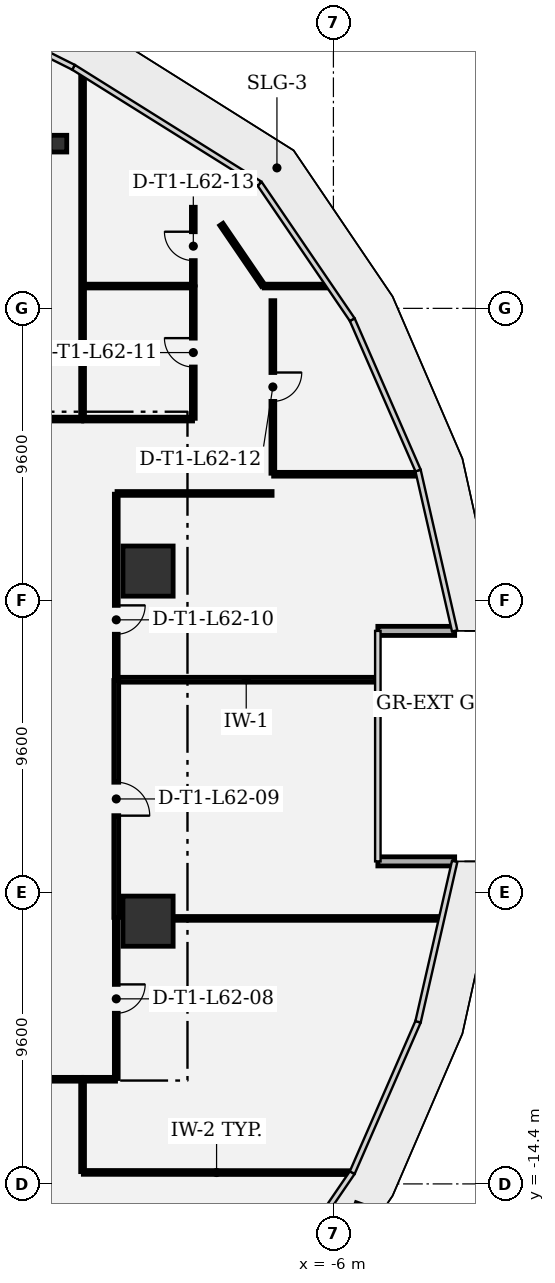
"""IFC4 building model, lengths in metres.
Left out: names, types, materials, properties, quantities, classifications, styles, units other than length and angle.
Written with IfcOpenShell. Run it as: python <this file> out.ifc"""

import sys

from ifc_helpers import new_model, si_unit, direction, frame, frame_2d, origin, origin_2d, place, context, subcontext, project, spatial, rectangle, extrude, element, fill, save


model = new_model("IFC4")
c1 = context("Model", 3, precision=1e-05, world=origin(), true_north=direction((0.0, 1.0)))
c2 = subcontext(c1, "Body", "Model", "MODEL_VIEW")
j1 = project(units=[si_unit("LENGTHUNIT", "METRE"), si_unit("PLANEANGLEUNIT", "RADIAN")], contexts=[c1])
p1 = place(None, origin())
s1 = spatial("IfcSite", under=j1, at=p1, CompositionType="ELEMENT")
p2 = place(p1, origin())
s2 = spatial("IfcBuilding", under=s1, at=p2, CompositionType="ELEMENT")
p3 = place(p2, frame((0.0, 0.0, 268.2)))
s3 = spatial("IfcBuildingStorey", under=s2, at=p3, CompositionType="ELEMENT", Elevation=268.2)
for number, where, z_axis, x_axis in (
    (1, (-12.097, -5.758, 0.0), (0.0, 0.0, 1.0), (1.0, 0.0, 0.0)),
    (2, (-12.097, 5.758, 0.0), (0.0, 0.0, 1.0), (1.0, 0.0, 0.0)),
):
    element("IfcColumn", number, at=place(p3, frame(where, z_axis=z_axis, x_axis=x_axis)), inside=s3, PredefinedType="COLUMN", context=c2, shape_type="SweptSolid", body=[
        extrude(rectangle(XDim=1.65, YDim=1.65, at=origin_2d()), origin(), (0.0, 0.0, 1.0), 4.2),
    ])
p4 = place(p3, frame((-15.046, 19.818, 0.0), z_axis=(0.0, 0.0, 1.0), x_axis=(1.0, 0.0, 0.0)))
e3 = element("IfcColumn", 3, at=p4, inside=s3, PredefinedType="COLUMN", context=c2, shape_type="SweptSolid", body=[
    extrude(rectangle(XDim=0.55, YDim=0.55, at=origin_2d()), origin(), (0.0, 0.0, 1.0), 4.2),
])
for number, where, z_axis, x_axis in (
    (4, (-2.011, -3.791, 0.0), (0.0, 0.0, 1.0), (-1.0, 0.0, 0.0)),
    (5, (-4.539, 3.791, 0.0), (0.0, 0.0, 1.0), (1.0, 0.0, 0.0)),
):
    element("IfcWall", number, at=place(p3, frame(where, z_axis=z_axis, x_axis=x_axis)), inside=s3, PredefinedType="SOLIDWALL", context=c2, shape_type="SweptSolid", body=[
        extrude(rectangle(XDim=2.527, YDim=0.3, at=frame_2d((1.264, 0.0))), origin(), (0.0, 0.0, 1.0), 3.91),
    ])
p5 = place(p3, frame((-14.225, -14.021, 0.0), z_axis=(0.0, 0.0, 1.0), x_axis=(0.999999627134, -0.000863557536, 0.0)))
e6 = element("IfcWall", 6, at=p5, inside=s3, PredefinedType="PARTITIONING", context=c2, shape_type="SweptSolid", body=[
    extrude(rectangle(XDim=8.764, YDim=0.125, at=frame_2d((4.382, 0.0))), origin(), (0.0, 0.0, 1.0), 3.91),
])
p6 = place(p3, frame((-14.25, -13.997, 0.0), z_axis=(0.0, 0.0, 1.0), x_axis=(0.0, 1.0, 0.0)))
e7 = element("IfcWall", 7, at=p6, inside=s3, PredefinedType="PARTITIONING", context=c2, shape_type="SweptSolid", body=[
    extrude(rectangle(XDim=3.014, YDim=0.125, at=frame_2d((1.507, 0.0))), origin(), (0.0, 0.0, 1.0), 3.13),
])
p7 = place(p3, frame((-38.384, -10.958, 0.0), z_axis=(0.0, 0.0, 1.0), x_axis=(1.0, 0.0, 0.0)))
e8 = element("IfcWall", 8, at=p7, inside=s3, PredefinedType="PARTITIONING", context=c2, shape_type="SweptSolid", body=[
    extrude(rectangle(XDim=24.109, YDim=0.125, at=frame_2d((12.055, 0.0))), origin(), (0.0, 0.0, 1.0), 3.13),
])
p8 = place(p7, frame((11.58, 0.0, 0.0)))
e9 = element("IfcOpeningElement", 9, at=p8, cuts=e8, PredefinedType="OPENING", context=c2, shape_type="SweptSolid", body=[
    extrude(rectangle(XDim=0.95, YDim=2.15, at=frame_2d((0.475, 1.075))), frame((0.0, 0.073, 0.0), z_axis=(0.0, -1.0, 0.0), x_axis=(1.0, 0.0, 0.0)), (0.0, 0.0, 1.0), 0.145),
])
p9 = place(p3, frame((-14.275, 10.758, 0.0), z_axis=(0.0, 0.0, 1.0), x_axis=(-1.0, 0.0, 0.0)))
e10 = element("IfcWall", 10, at=p9, inside=s3, PredefinedType="PARTITIONING", context=c2, shape_type="SweptSolid", body=[
    extrude(rectangle(XDim=23.473, YDim=0.125, at=frame_2d((11.736, 0.0))), origin(), (0.0, 0.0, 1.0), 3.13),
])
p10 = place(p3, frame((-14.25, 10.783, 0.0), z_axis=(0.0, 0.0, 1.0), x_axis=(0.0, 1.0, 0.0)))
e11 = element("IfcWall", 11, at=p10, inside=s3, PredefinedType="PARTITIONING", context=c2, shape_type="SweptSolid", body=[
    extrude(rectangle(XDim=11.28, YDim=0.125, at=frame_2d((5.64, 0.0))), origin(), (0.0, 0.0, 1.0), 3.13),
])
p11 = place(p3, frame((-2.52, -5.667, 0.0), z_axis=(0.0, 0.0, 1.0), x_axis=(-1.0, 0.0, 0.0)))
e12 = element("IfcWall", 12, at=p11, inside=s3, PredefinedType="PARTITIONING", context=c2, shape_type="SweptSolid", body=[
    extrude(rectangle(XDim=8.687, YDim=0.125, at=frame_2d((4.344, 0.0))), origin(), (0.0, 0.0, 1.0), 3.91),
])
p12 = place(p3, frame((-13.142, -5.692, 0.0), z_axis=(0.0, 0.0, 1.0), x_axis=(0.0, -1.0, 0.0)))
e13 = element("IfcWall", 13, at=p12, inside=s3, PredefinedType="PARTITIONING", context=c2, shape_type="SweptSolid", body=[
    extrude(rectangle(XDim=5.241, YDim=0.125, at=frame_2d((2.621, 0.0))), origin(), (0.0, 0.0, 1.0), 3.13),
])
p13 = place(p12, frame((2.146, 0.0, 0.0)))
e14 = element("IfcOpeningElement", 14, at=p13, cuts=e13, PredefinedType="OPENING", context=c2, shape_type="SweptSolid", body=[
    extrude(rectangle(XDim=0.95, YDim=2.15, at=frame_2d((0.475, 1.075))), frame((0.0, 0.073, 0.0), z_axis=(0.0, -1.0, 0.0), x_axis=(1.0, 0.0, 0.0)), (0.0, 0.0, 1.0), 0.145),
])
p14 = place(p3, frame((-14.217, -10.958, 0.0), z_axis=(0.0, 0.0, 1.0), x_axis=(1.0, 0.0, 0.0)))
e15 = element("IfcWall", 15, at=p14, inside=s3, PredefinedType="PARTITIONING", context=c2, shape_type="SweptSolid", body=[
    extrude(rectangle(XDim=1.05, YDim=0.125, at=frame_2d((0.525, 0.0))), origin(), (0.0, 0.0, 1.0), 3.91),
])
p15 = place(p3, frame((-4.619, 2.184, 0.0), z_axis=(0.0, 0.0, 1.0), x_axis=(-1.0, 0.0, 0.0)))
e16 = element("IfcWall", 16, at=p15, inside=s3, PredefinedType="PARTITIONING", context=c2, shape_type="SweptSolid", body=[
    extrude(rectangle(XDim=8.499, YDim=0.16, at=frame_2d((4.249, 0.0))), origin(), (0.0, 0.0, 1.0), 3.91),
])
p16 = place(p3, frame((-13.142, 2.159, 0.0), z_axis=(0.0, 0.0, 1.0), x_axis=(0.0, -1.0, 0.0)))
e17 = element("IfcWall", 17, at=p16, inside=s3, PredefinedType="PARTITIONING", context=c2, shape_type="SweptSolid", body=[
    extrude(rectangle(XDim=7.793, YDim=0.16, at=frame_2d((3.896, 0.0))), origin(), (0.0, 0.0, 1.0), 3.91),
])
p17 = place(p16, frame((3.346, 0.0, 0.0)))
e18 = element("IfcOpeningElement", 18, at=p17, cuts=e17, PredefinedType="OPENING", context=c2, shape_type="SweptSolid", body=[
    extrude(rectangle(XDim=1.1, YDim=2.15, at=frame_2d((0.55, 1.075))), frame((0.0, 0.09, 0.0), z_axis=(0.0, -1.0, 0.0), x_axis=(1.0, 0.0, 0.0)), (0.0, 0.0, 1.0), 0.18),
])
p18 = place(p3, frame((-3.268, 8.943, 0.0), z_axis=(0.0, 0.0, 1.0), x_axis=(-1.0, 0.0, 0.0)))
e19 = element("IfcWall", 19, at=p18, inside=s3, PredefinedType="PARTITIONING", context=c2, shape_type="SweptSolid", body=[
    extrude(rectangle(XDim=4.699, YDim=0.125, at=frame_2d((2.349, 0.0))), origin(), (0.0, 0.0, 1.0), 3.91),
])
p19 = place(p3, frame((-8.017, 8.312, 0.0), z_axis=(0.0, 0.0, 1.0), x_axis=(-1.0, 0.0, 0.0)))
e20 = element("IfcWall", 20, at=p19, inside=s3, PredefinedType="PARTITIONING", context=c2, shape_type="SweptSolid", body=[
    extrude(rectangle(XDim=5.1, YDim=0.125, at=frame_2d((2.55, 0.0))), origin(), (0.0, 0.0, 1.0), 3.91),
])
p20 = place(p3, frame((-13.142, 8.287, 0.0), z_axis=(0.0, 0.0, 1.0), x_axis=(0.0, -1.0, 0.0)))
e21 = element("IfcWall", 21, at=p20, inside=s3, PredefinedType="PARTITIONING", context=c2, shape_type="SweptSolid", body=[
    extrude(rectangle(XDim=6.07, YDim=0.125, at=frame_2d((3.035, 0.0))), origin(), (0.0, 0.0, 1.0), 3.13),
])
p21 = place(p20, frame((3.657, 0.0, 0.0)))
e22 = element("IfcOpeningElement", 22, at=p21, cuts=e21, PredefinedType="OPENING", context=c2, shape_type="SweptSolid", body=[
    extrude(rectangle(XDim=0.95, YDim=2.15, at=frame_2d((0.475, 1.075))), frame((0.0, 0.073, 0.0), z_axis=(0.0, -1.0, 0.0), x_axis=(1.0, 0.0, 0.0)), (0.0, 0.0, 1.0), 0.145),
])
p22 = place(p3, frame((-6.214, 15.134, 0.0), z_axis=(0.0, 0.0, 1.0), x_axis=(-1.0, 0.0, 0.0)))
e23 = element("IfcWall", 23, at=p22, inside=s3, PredefinedType="PARTITIONING", context=c2, shape_type="SweptSolid", body=[
    extrude(rectangle(XDim=2.064, YDim=0.125, at=frame_2d((1.032, 0.0))), origin(), (0.0, 0.0, 1.0), 3.91),
])
p23 = place(p3, frame((-7.992, 14.653, 0.0), z_axis=(0.0, 0.0, 1.0), x_axis=(0.0, -1.0, 0.0)))
e24 = element("IfcWall", 24, at=p23, inside=s3, PredefinedType="PARTITIONING", context=c2, shape_type="SweptSolid", body=[
    extrude(rectangle(XDim=5.677, YDim=0.125, at=frame_2d((2.838, 0.0))), origin(), (0.0, 0.0, 1.0), 3.91),
])
p24 = place(p23, frame((2.363, 0.0, 0.0)))
e25 = element("IfcOpeningElement", 25, at=p24, cuts=e24, PredefinedType="OPENING", context=c2, shape_type="SweptSolid", body=[
    extrude(rectangle(XDim=0.95, YDim=2.15, at=frame_2d((0.475, 1.075))), frame((0.0, 0.073, 0.0), z_axis=(0.0, -1.0, 0.0), x_axis=(1.0, 0.0, 0.0)), (0.0, 0.0, 1.0), 0.145),
])
p25 = place(p3, frame((-14.217, 10.758, 0.0), z_axis=(0.0, 0.0, 1.0), x_axis=(1.0, 0.0, 0.0)))
e26 = element("IfcWall", 26, at=p25, inside=s3, PredefinedType="PARTITIONING", context=c2, shape_type="SweptSolid", body=[
    extrude(rectangle(XDim=3.584, YDim=0.125, at=frame_2d((1.792, 0.0))), origin(), (0.0, 0.0, 1.0), 3.91),
])
p26 = place(p3, frame((-10.608, 10.783, 0.0), z_axis=(0.0, 0.0, 1.0), x_axis=(0.0, 1.0, 0.0)))
e27 = element("IfcWall", 27, at=p26, inside=s3, PredefinedType="PARTITIONING", context=c2, shape_type="SweptSolid", body=[
    extrude(rectangle(XDim=4.325, YDim=0.125, at=frame_2d((2.163, 0.0))), origin(), (0.0, 0.0, 1.0), 3.91),
])
p27 = place(p26, frame((1.688, 0.0, 0.0)))
e28 = element("IfcOpeningElement", 28, at=p27, cuts=e27, PredefinedType="OPENING", context=c2, shape_type="SweptSolid", body=[
    extrude(rectangle(XDim=0.95, YDim=2.15, at=frame_2d((0.475, 1.075))), frame((0.0, 0.073, 0.0), z_axis=(0.0, -1.0, 0.0), x_axis=(1.0, 0.0, 0.0)), (0.0, 0.0, 1.0), 0.145),
])
p28 = place(p3, frame((-10.633, 15.134, 0.0), z_axis=(0.0, 0.0, 1.0), x_axis=(-1.0, 0.0, 0.0)))
e29 = element("IfcWall", 29, at=p28, inside=s3, PredefinedType="PARTITIONING", context=c2, shape_type="SweptSolid", body=[
    extrude(rectangle(XDim=3.507, YDim=0.125, at=frame_2d((1.753, 0.0))), origin(), (0.0, 0.0, 1.0), 3.91),
])
p29 = place(p3, frame((-10.608, 15.167, 0.0), z_axis=(0.0, 0.0, 1.0), x_axis=(0.0, 1.0, 0.0)))
e30 = element("IfcWall", 30, at=p29, inside=s3, PredefinedType="PARTITIONING", context=c2, shape_type="SweptSolid", body=[
    extrude(rectangle(XDim=2.559, YDim=0.125, at=frame_2d((1.28, 0.0))), origin(), (0.0, 0.0, 1.0), 3.91),
])
p30 = place(p29, frame((0.804, 0.0, 0.0)))
e31 = element("IfcOpeningElement", 31, at=p30, cuts=e30, PredefinedType="OPENING", context=c2, shape_type="SweptSolid", body=[
    extrude(rectangle(XDim=0.95, YDim=2.15, at=frame_2d((0.475, 1.075))), frame((0.0, 0.073, 0.0), z_axis=(0.0, -1.0, 0.0), x_axis=(1.0, 0.0, 0.0)), (0.0, 0.0, 1.0), 0.145),
])
p31 = place(p3, frame((-8.322, 15.162, 0.0), z_axis=(0.0, 0.0, 1.0), x_axis=(-0.563220914523, 0.826306360525, 0.0)))
e32 = element("IfcWall", 32, at=p31, inside=s3, PredefinedType="PARTITIONING", context=c2, shape_type="SweptSolid", body=[
    extrude(rectangle(XDim=2.418, YDim=0.125, at=frame_2d((1.209, 0.0))), origin(), (0.0, 0.0, 1.0), 3.91),
])
p32 = place(p13, origin())
e33 = element("IfcDoor", 33, at=p32, inside=s3, OperationType="SINGLE_SWING_LEFT", PredefinedType="DOOR", context=c2, shape_type="SweptSolid", body=[
    extrude(rectangle(XDim=0.95, YDim=2.15, at=frame_2d((0.475, 1.075))), frame((0.0, 0.025, 0.0), z_axis=(0.0, -1.0, 0.0), x_axis=(1.0, 0.0, 0.0)), (0.0, 0.0, 1.0), 0.05),
])
fill(e14, e33)
p33 = place(p17, origin())
e34 = element("IfcDoor", 34, at=p33, inside=s3, OperationType="SINGLE_SWING_RIGHT", PredefinedType="DOOR", context=c2, shape_type="SweptSolid", body=[
    extrude(rectangle(XDim=1.1, YDim=2.15, at=frame_2d((0.55, 1.075))), frame((0.0, 0.025, 0.0), z_axis=(0.0, -1.0, 0.0), x_axis=(1.0, 0.0, 0.0)), (0.0, 0.0, 1.0), 0.05),
])
fill(e18, e34)
p34 = place(p21, origin())
e35 = element("IfcDoor", 35, at=p34, inside=s3, OperationType="SINGLE_SWING_LEFT", PredefinedType="DOOR", context=c2, shape_type="SweptSolid", body=[
    extrude(rectangle(XDim=0.95, YDim=2.15, at=frame_2d((0.475, 1.075))), frame((0.0, 0.025, 0.0), z_axis=(0.0, -1.0, 0.0), x_axis=(1.0, 0.0, 0.0)), (0.0, 0.0, 1.0), 0.05),
])
fill(e22, e35)
p35 = place(p27, origin())
e36 = element("IfcDoor", 36, at=p35, inside=s3, OperationType="SINGLE_SWING_RIGHT", PredefinedType="DOOR", context=c2, shape_type="SweptSolid", body=[
    extrude(rectangle(XDim=0.95, YDim=2.15, at=frame_2d((0.475, 1.075))), frame((0.0, 0.025, 0.0), z_axis=(0.0, -1.0, 0.0), x_axis=(1.0, 0.0, 0.0)), (0.0, 0.0, 1.0), 0.05),
])
fill(e28, e36)
p36 = place(p24, origin())
e37 = element("IfcDoor", 37, at=p36, inside=s3, OperationType="SINGLE_SWING_LEFT", PredefinedType="DOOR", context=c2, shape_type="SweptSolid", body=[
    extrude(rectangle(XDim=0.95, YDim=2.15, at=frame_2d((0.475, 1.075))), frame((0.0, 0.025, 0.0), z_axis=(0.0, -1.0, 0.0), x_axis=(1.0, 0.0, 0.0)), (0.0, 0.0, 1.0), 0.05),
])
fill(e25, e37)
p37 = place(p30, origin())
e38 = element("IfcDoor", 38, at=p37, inside=s3, OperationType="SINGLE_SWING_RIGHT", PredefinedType="DOOR", context=c2, shape_type="SweptSolid", body=[
    extrude(rectangle(XDim=0.95, YDim=2.15, at=frame_2d((0.475, 1.075))), frame((0.0, 0.025, 0.0), z_axis=(0.0, -1.0, 0.0), x_axis=(1.0, 0.0, 0.0)), (0.0, 0.0, 1.0), 0.05),
])
fill(e31, e38)
save(model, sys.argv[1])
